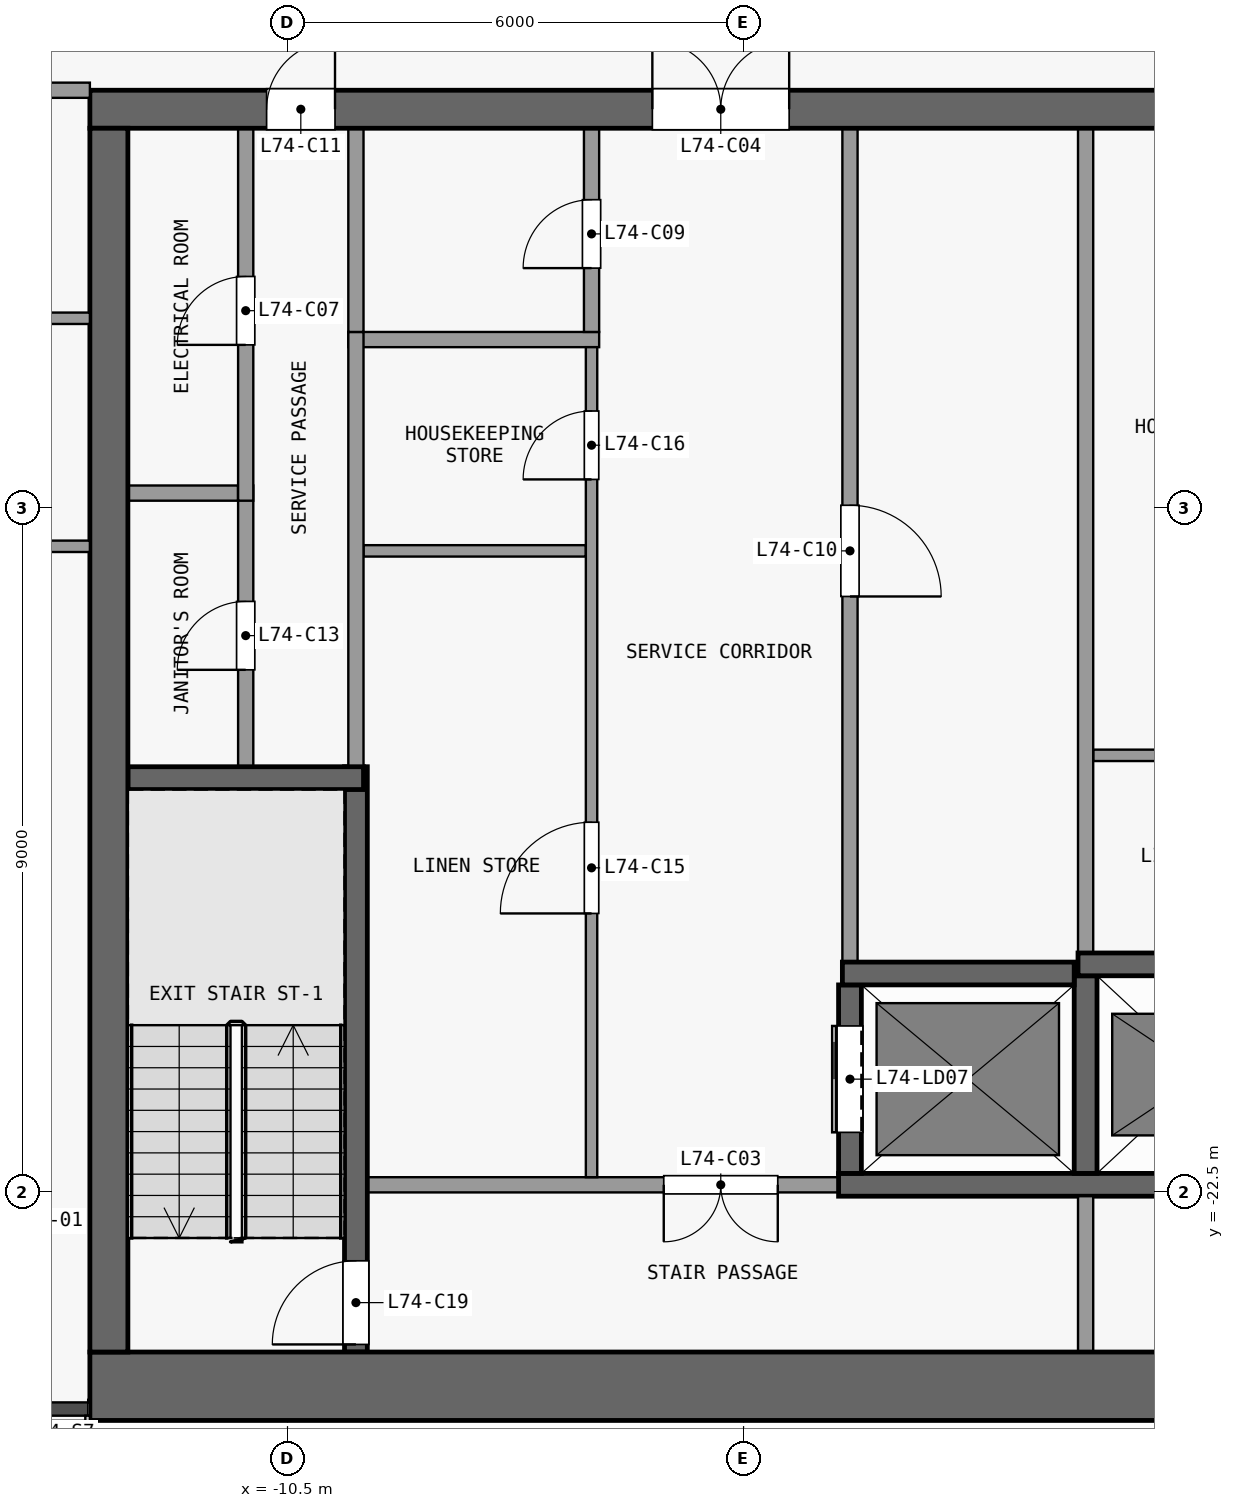
"""IFC4 building model, lengths in metres.
Left out: names, types, materials, properties, quantities, classifications, styles, units other than length and angle.
Written with IfcOpenShell. Run it as: python <this file> out.ifc"""

import sys

from ifc_helpers import new_model, si_unit, direction, frame, frame_2d, origin, place, context, subcontext, project, spatial, rectangle, extrude, element, fill, save


model = new_model("IFC4")
c1 = context("Model", 3, precision=1e-05, world=origin(), true_north=direction((0.0, 1.0)))
c2 = subcontext(c1, "Body", "Model", "MODEL_VIEW")
j1 = project(units=[si_unit("LENGTHUNIT", "METRE"), si_unit("PLANEANGLEUNIT", "RADIAN")], contexts=[c1])
p1 = place(None, origin())
s1 = spatial("IfcSite", under=j1, at=p1, CompositionType="ELEMENT")
p2 = place(p1, origin())
s2 = spatial("IfcBuilding", under=s1, at=p2, CompositionType="ELEMENT")
p3 = place(p2, frame((0.0, 0.0, 291.5)))
s3 = spatial("IfcBuildingStorey", under=s2, at=p3, CompositionType="ELEMENT", Elevation=291.5)
p4 = place(p3, frame((-13.1, -25.05, 0.0), z_axis=(0.0, 0.0, 1.0), x_axis=(1.0, 0.0, 0.0)))
e1 = element("IfcWall", 1, at=p4, inside=s3, PredefinedType="SHEAR", context=c2, shape_type="SweptSolid", body=[
    extrude(rectangle(XDim=26.2, YDim=0.9, at=frame_2d((13.1, 0.0))), origin(), (0.0, 0.0, 1.0), 3.3),
])
p5 = place(p3, frame((-13.1, -8.25, 0.0), z_axis=(0.0, 0.0, 1.0), x_axis=(1.0, 0.0, 0.0)))
e2 = element("IfcWall", 2, at=p5, inside=s3, PredefinedType="SHEAR", context=c2, shape_type="SweptSolid", body=[
    extrude(rectangle(XDim=26.2, YDim=0.5, at=frame_2d((13.1, 0.0))), origin(), (0.0, 0.0, 1.0), 3.3),
])
p6 = place(p5, frame((7.4, 0.0, 0.0)))
e3 = element("IfcOpeningElement", 3, at=p6, cuts=e2, PredefinedType="OPENING", context=c2, shape_type="SweptSolid", body=[
    extrude(rectangle(XDim=1.8, YDim=2.1, at=frame_2d((0.9, 1.05))), frame((0.0, 0.26, 0.0), z_axis=(0.0, -1.0, 0.0), x_axis=(1.0, 0.0, 0.0)), (0.0, 0.0, 1.0), 0.52),
])
p7 = place(p5, frame((17.0, 0.0, 0.0)))
e4 = element("IfcOpeningElement", 4, at=p7, cuts=e2, PredefinedType="OPENING", context=c2, shape_type="SweptSolid", body=[
    extrude(rectangle(XDim=1.8, YDim=2.1, at=frame_2d((0.9, 1.05))), frame((0.0, 0.26, 0.0), z_axis=(0.0, -1.0, 0.0), x_axis=(1.0, 0.0, 0.0)), (0.0, 0.0, 1.0), 0.52),
])
p8 = place(p5, frame((2.325, 0.0, 0.0)))
e5 = element("IfcOpeningElement", 5, at=p8, cuts=e2, PredefinedType="OPENING", context=c2, shape_type="SweptSolid", body=[
    extrude(rectangle(XDim=0.9, YDim=2.1, at=frame_2d((0.45, 1.05))), frame((0.0, 0.26, 0.0), z_axis=(0.0, -1.0, 0.0), x_axis=(1.0, 0.0, 0.0)), (0.0, 0.0, 1.0), 0.52),
])
p9 = place(p5, frame((22.975, 0.0, 0.0)))
e6 = element("IfcOpeningElement", 6, at=p9, cuts=e2, PredefinedType="OPENING", context=c2, shape_type="SweptSolid", body=[
    extrude(rectangle(XDim=0.9, YDim=2.1, at=frame_2d((0.45, 1.05))), frame((0.0, 0.26, 0.0), z_axis=(0.0, -1.0, 0.0), x_axis=(1.0, 0.0, 0.0)), (0.0, 0.0, 1.0), 0.52),
])
p10 = place(p3, frame((-12.85, -24.6, 0.0), z_axis=(0.0, 0.0, 1.0), x_axis=(0.0, 1.0, 0.0)))
e7 = element("IfcWall", 7, at=p10, inside=s3, PredefinedType="SHEAR", context=c2, shape_type="SweptSolid", body=[
    extrude(rectangle(XDim=16.1, YDim=0.5, at=frame_2d((8.05, 0.0))), origin(), (0.0, 0.0, 1.0), 3.3),
])
p11 = place(p3, frame((-3.25, -22.4, 0.0), z_axis=(0.0, 0.0, 1.0), x_axis=(-1.0, 0.0, 0.0)))
e8 = element("IfcWall", 8, at=p11, inside=s3, PredefinedType="PARTITIONING", context=c2, shape_type="SweptSolid", body=[
    extrude(rectangle(XDim=6.2, YDim=0.2, at=frame_2d((3.1, 0.0))), origin(), (0.0, 0.0, 1.0), 3.3),
])
p12 = place(p11, frame((0.8, 0.0, 0.0)))
e9 = element("IfcOpeningElement", 9, at=p12, cuts=e8, PredefinedType="OPENING", context=c2, shape_type="SweptSolid", body=[
    extrude(rectangle(XDim=1.5, YDim=2.1, at=frame_2d((0.75, 1.05))), frame((0.0, 0.11, 0.0), z_axis=(0.0, -1.0, 0.0), x_axis=(1.0, 0.0, 0.0)), (0.0, 0.0, 1.0), 0.22),
])
p13 = place(p3, frame((-3.25, -22.4, 0.0), z_axis=(0.0, 0.0, 1.0), x_axis=(1.0, 0.0, 0.0)))
e10 = element("IfcWall", 10, at=p13, inside=s3, PredefinedType="SHEAR", context=c2, shape_type="SweptSolid", body=[
    extrude(rectangle(XDim=6.5, YDim=0.3, at=frame_2d((3.25, 0.0))), origin(), (0.0, 0.0, 1.0), 3.3),
])
p14 = place(p3, frame((-3.2, -19.62, 0.0), z_axis=(0.0, 0.0, 1.0), x_axis=(1.0, 0.0, 0.0)))
e11 = element("IfcWall", 11, at=p14, inside=s3, PredefinedType="SHEAR", context=c2, shape_type="SweptSolid", body=[
    extrude(rectangle(XDim=3.05, YDim=0.3, at=frame_2d((1.525, 0.0))), origin(), (0.0, 0.0, 1.0), 3.3),
])
p15 = place(p3, frame((-0.1, -19.5, 0.0), z_axis=(0.0, 0.0, 1.0), x_axis=(1.0, 0.0, 0.0)))
e12 = element("IfcWall", 12, at=p15, inside=s3, PredefinedType="SHEAR", context=c2, shape_type="SweptSolid", body=[
    extrude(rectangle(XDim=3.275, YDim=0.3, at=frame_2d((1.638, 0.0))), origin(), (0.0, 0.0, 1.0), 3.3),
])
p16 = place(p3, frame((-12.6, -17.05, 0.0), z_axis=(0.0, 0.0, 1.0), x_axis=(1.0, 0.0, 0.0)))
e13 = element("IfcWall", 13, at=p16, inside=s3, PredefinedType="SHEAR", context=c2, shape_type="SweptSolid", body=[
    extrude(rectangle(XDim=3.1, YDim=0.3, at=frame_2d((1.55, 0.0))), origin(), (0.0, 0.0, 1.0), 3.3),
])
p17 = place(p3, frame((0.1, -16.75, 0.0), z_axis=(0.0, 0.0, 1.0), x_axis=(1.0, 0.0, 0.0)))
e14 = element("IfcWall", 14, at=p17, inside=s3, PredefinedType="PARTITIONING", context=c2, shape_type="SweptSolid", body=[
    extrude(rectangle(XDim=2.925, YDim=0.15, at=frame_2d((1.462, 0.0))), origin(), (0.0, 0.0, 1.0), 3.3),
])
p18 = place(p3, frame((-9.5, -14.06, 0.0), z_axis=(0.0, 0.0, 1.0), x_axis=(1.0, 0.0, 0.0)))
e15 = element("IfcWall", 15, at=p18, inside=s3, PredefinedType="PARTITIONING", context=c2, shape_type="SweptSolid", body=[
    extrude(rectangle(XDim=2.925, YDim=0.15, at=frame_2d((1.462, 0.0))), origin(), (0.0, 0.0, 1.0), 3.3),
])
p19 = place(p3, frame((-12.6, -13.3, 0.0), z_axis=(0.0, 0.0, 1.0), x_axis=(1.0, 0.0, 0.0)))
e16 = element("IfcWall", 16, at=p19, inside=s3, PredefinedType="PARTITIONING", context=c2, shape_type="SweptSolid", body=[
    extrude(rectangle(XDim=1.45, YDim=0.2, at=frame_2d((0.725, 0.0))), origin(), (0.0, 0.0, 1.0), 3.3),
])
p20 = place(p3, frame((-9.7, -11.28, 0.0), z_axis=(0.0, 0.0, 1.0), x_axis=(1.0, 0.0, 0.0)))
e17 = element("IfcWall", 17, at=p20, inside=s3, PredefinedType="PARTITIONING", context=c2, shape_type="SweptSolid", body=[
    extrude(rectangle(XDim=3.3, YDim=0.2, at=frame_2d((1.65, 0.0))), origin(), (0.0, 0.0, 1.0), 3.3),
])
p21 = place(p3, frame((-11.05, -16.9, 0.0), z_axis=(0.0, 0.0, 1.0), x_axis=(0.0, 1.0, 0.0)))
e18 = element("IfcWall", 18, at=p21, inside=s3, PredefinedType="PARTITIONING", context=c2, shape_type="SweptSolid", body=[
    extrude(rectangle(XDim=3.7, YDim=0.2, at=frame_2d((1.85, 0.0))), origin(), (0.0, 0.0, 1.0), 3.3),
])
p22 = place(p21, frame((1.275, 0.0, 0.0)))
e19 = element("IfcOpeningElement", 19, at=p22, cuts=e18, PredefinedType="OPENING", context=c2, shape_type="SweptSolid", body=[
    extrude(rectangle(XDim=0.9, YDim=2.1, at=frame_2d((0.45, 1.05))), frame((0.0, 0.11, 0.0), z_axis=(0.0, -1.0, 0.0), x_axis=(1.0, 0.0, 0.0)), (0.0, 0.0, 1.0), 0.22),
])
p23 = place(p3, frame((-11.05, -13.4, 0.0), z_axis=(0.0, 0.0, 1.0), x_axis=(0.0, 1.0, 0.0)))
e20 = element("IfcWall", 20, at=p23, inside=s3, PredefinedType="PARTITIONING", context=c2, shape_type="SweptSolid", body=[
    extrude(rectangle(XDim=4.9, YDim=0.2, at=frame_2d((2.45, 0.0))), origin(), (0.0, 0.0, 1.0), 3.3),
])
p24 = place(p23, frame((2.05, 0.0, 0.0)))
e21 = element("IfcOpeningElement", 21, at=p24, cuts=e20, PredefinedType="OPENING", context=c2, shape_type="SweptSolid", body=[
    extrude(rectangle(XDim=0.9, YDim=2.1, at=frame_2d((0.45, 1.05))), frame((0.0, 0.11, 0.0), z_axis=(0.0, -1.0, 0.0), x_axis=(1.0, 0.0, 0.0)), (0.0, 0.0, 1.0), 0.22),
])
p25 = place(p3, frame((-9.6, -24.6, 0.0), z_axis=(0.0, 0.0, 1.0), x_axis=(0.0, 1.0, 0.0)))
e22 = element("IfcWall", 22, at=p25, inside=s3, PredefinedType="SHEAR", context=c2, shape_type="SweptSolid", body=[
    extrude(rectangle(XDim=7.7, YDim=0.3, at=frame_2d((3.85, 0.0))), origin(), (0.0, 0.0, 1.0), 3.3),
])
p26 = place(p25, frame((0.1, 0.0, 0.0)))
e23 = element("IfcOpeningElement", 23, at=p26, cuts=e22, PredefinedType="OPENING", context=c2, shape_type="SweptSolid", body=[
    extrude(rectangle(XDim=1.1, YDim=2.1, at=frame_2d((0.55, 1.05))), frame((0.0, 0.16, 0.0), z_axis=(0.0, -1.0, 0.0), x_axis=(1.0, 0.0, 0.0)), (0.0, 0.0, 1.0), 0.32),
])
p27 = place(p3, frame((-9.6, -16.9, 0.0), z_axis=(0.0, 0.0, 1.0), x_axis=(0.0, 1.0, 0.0)))
e24 = element("IfcWall", 24, at=p27, inside=s3, PredefinedType="PARTITIONING", context=c2, shape_type="SweptSolid", body=[
    extrude(rectangle(XDim=5.72, YDim=0.2, at=frame_2d((2.86, 0.0))), origin(), (0.0, 0.0, 1.0), 3.3),
])
p28 = place(p3, frame((-9.6, -11.18, 0.0), z_axis=(0.0, 0.0, 1.0), x_axis=(0.0, 1.0, 0.0)))
e25 = element("IfcWall", 25, at=p28, inside=s3, PredefinedType="PARTITIONING", context=c2, shape_type="SweptSolid", body=[
    extrude(rectangle(XDim=2.68, YDim=0.2, at=frame_2d((1.34, 0.0))), origin(), (0.0, 0.0, 1.0), 3.3),
])
p29 = place(p3, frame((-6.5, -22.3, 0.0), z_axis=(0.0, 0.0, 1.0), x_axis=(0.0, 1.0, 0.0)))
e26 = element("IfcWall", 26, at=p29, inside=s3, PredefinedType="PARTITIONING", context=c2, shape_type="SweptSolid", body=[
    extrude(rectangle(XDim=10.92, YDim=0.15, at=frame_2d((5.46, 0.0))), origin(), (0.0, 0.0, 1.0), 3.3),
])
p30 = place(p29, frame((3.47, 0.0, 0.0)))
e27 = element("IfcOpeningElement", 27, at=p30, cuts=e26, PredefinedType="OPENING", context=c2, shape_type="SweptSolid", body=[
    extrude(rectangle(XDim=1.2, YDim=2.1, at=frame_2d((0.6, 1.05))), frame((0.0, 0.085, 0.0), z_axis=(0.0, -1.0, 0.0), x_axis=(1.0, 0.0, 0.0)), (0.0, 0.0, 1.0), 0.17),
])
p31 = place(p29, frame((9.18, 0.0, 0.0)))
e28 = element("IfcOpeningElement", 28, at=p31, cuts=e26, PredefinedType="OPENING", context=c2, shape_type="SweptSolid", body=[
    extrude(rectangle(XDim=0.9, YDim=2.1, at=frame_2d((0.45, 1.05))), frame((0.0, 0.085, 0.0), z_axis=(0.0, -1.0, 0.0), x_axis=(1.0, 0.0, 0.0)), (0.0, 0.0, 1.0), 0.17),
])
p32 = place(p3, frame((-6.5, -11.18, 0.0), z_axis=(0.0, 0.0, 1.0), x_axis=(0.0, 1.0, 0.0)))
e29 = element("IfcWall", 29, at=p32, inside=s3, PredefinedType="PARTITIONING", context=c2, shape_type="SweptSolid", body=[
    extrude(rectangle(XDim=2.68, YDim=0.2, at=frame_2d((1.34, 0.0))), origin(), (0.0, 0.0, 1.0), 3.3),
])
p33 = place(p32, frame((0.84, 0.0, 0.0)))
e30 = element("IfcOpeningElement", 30, at=p33, cuts=e29, PredefinedType="OPENING", context=c2, shape_type="SweptSolid", body=[
    extrude(rectangle(XDim=0.9, YDim=2.1, at=frame_2d((0.45, 1.05))), frame((0.0, 0.11, 0.0), z_axis=(0.0, -1.0, 0.0), x_axis=(1.0, 0.0, 0.0)), (0.0, 0.0, 1.0), 0.22),
])
p34 = place(p3, frame((-3.1, -22.25, 0.0), z_axis=(0.0, 0.0, 1.0), x_axis=(0.0, 1.0, 0.0)))
e31 = element("IfcWall", 31, at=p34, inside=s3, PredefinedType="SHEAR", context=c2, shape_type="SweptSolid", body=[
    extrude(rectangle(XDim=2.48, YDim=0.3, at=frame_2d((1.24, 0.0))), origin(), (0.0, 0.0, 1.0), 3.3),
])
p35 = place(p34, frame((0.54, 0.0, 0.0)))
e32 = element("IfcOpeningElement", 32, at=p35, cuts=e31, PredefinedType="OPENING", context=c2, shape_type="SweptSolid", body=[
    extrude(rectangle(XDim=1.4, YDim=2.1, at=frame_2d((0.7, 1.05))), frame((0.0, 0.16, 0.0), z_axis=(0.0, -1.0, 0.0), x_axis=(1.0, 0.0, 0.0)), (0.0, 0.0, 1.0), 0.32),
])
p36 = place(p3, frame((-3.1, -8.5, 0.0), z_axis=(0.0, 0.0, 1.0), x_axis=(0.0, -1.0, 0.0)))
e33 = element("IfcWall", 33, at=p36, inside=s3, PredefinedType="PARTITIONING", context=c2, shape_type="SweptSolid", body=[
    extrude(rectangle(XDim=10.97, YDim=0.2, at=frame_2d((5.485, 0.0))), origin(), (0.0, 0.0, 1.0), 3.3),
])
p37 = place(p36, frame((4.96, 0.0, 0.0)))
e34 = element("IfcOpeningElement", 34, at=p37, cuts=e33, PredefinedType="OPENING", context=c2, shape_type="SweptSolid", body=[
    extrude(rectangle(XDim=1.2, YDim=2.1, at=frame_2d((0.6, 1.05))), frame((0.0, 0.11, 0.0), z_axis=(0.0, -1.0, 0.0), x_axis=(1.0, 0.0, 0.0)), (0.0, 0.0, 1.0), 0.22),
])
p38 = place(p3, frame((0.0, -24.6, 0.0), z_axis=(0.0, 0.0, 1.0), x_axis=(0.0, 1.0, 0.0)))
e35 = element("IfcWall", 35, at=p38, inside=s3, PredefinedType="PARTITIONING", context=c2, shape_type="SweptSolid", body=[
    extrude(rectangle(XDim=2.05, YDim=0.2, at=frame_2d((1.025, 0.0))), origin(), (0.0, 0.0, 1.0), 3.3),
])
p39 = place(p3, frame((0.0, -22.25, 0.0), z_axis=(0.0, 0.0, 1.0), x_axis=(0.0, 1.0, 0.0)))
e36 = element("IfcWall", 36, at=p39, inside=s3, PredefinedType="SHEAR", context=c2, shape_type="SweptSolid", body=[
    extrude(rectangle(XDim=2.6, YDim=0.3, at=frame_2d((1.3, 0.0))), origin(), (0.0, 0.0, 1.0), 3.3),
])
p40 = place(p3, frame((0.0, -19.35, 0.0), z_axis=(0.0, 0.0, 1.0), x_axis=(0.0, 1.0, 0.0)))
e37 = element("IfcWall", 37, at=p40, inside=s3, PredefinedType="PARTITIONING", context=c2, shape_type="SweptSolid", body=[
    extrude(rectangle(XDim=10.85, YDim=0.2, at=frame_2d((5.425, 0.0))), origin(), (0.0, 0.0, 1.0), 3.3),
])
p41 = place(p3, frame((-19.262, -14.0, 0.0), z_axis=(0.0, 0.0, 1.0), x_axis=(1.0, 0.0, 0.0)))
e38 = element("IfcWall", 38, at=p41, inside=s3, PredefinedType="PARTITIONING", context=c2, shape_type="SweptSolid", body=[
    extrude(rectangle(XDim=6.162, YDim=0.15, at=frame_2d((3.081, 0.0))), origin(), (0.0, 0.0, 1.0), 3.3),
])
p42 = place(p41, frame((0.812, 0.0, 0.0)))
e39 = element("IfcOpeningElement", 39, at=p42, cuts=e38, PredefinedType="OPENING", context=c2, shape_type="SweptSolid", body=[
    extrude(rectangle(XDim=0.9, YDim=2.1, at=frame_2d((0.45, 1.05))), frame((0.0, 0.085, 0.0), z_axis=(0.0, -1.0, 0.0), x_axis=(1.0, 0.0, 0.0)), (0.0, 0.0, 1.0), 0.17),
])
p43 = place(p3, frame((-20.163, -11.0, 0.0), z_axis=(0.0, 0.0, 1.0), x_axis=(1.0, 0.0, 0.0)))
e40 = element("IfcWall", 40, at=p43, inside=s3, PredefinedType="PARTITIONING", context=c2, shape_type="SweptSolid", body=[
    extrude(rectangle(XDim=7.062, YDim=0.15, at=frame_2d((3.531, 0.0))), origin(), (0.0, 0.0, 1.0), 3.3),
])
p44 = place(p43, frame((1.513, 0.0, 0.0)))
e41 = element("IfcOpeningElement", 41, at=p44, cuts=e40, PredefinedType="OPENING", context=c2, shape_type="SweptSolid", body=[
    extrude(rectangle(XDim=0.9, YDim=2.1, at=frame_2d((0.45, 1.05))), frame((0.0, 0.085, 0.0), z_axis=(0.0, -1.0, 0.0), x_axis=(1.0, 0.0, 0.0)), (0.0, 0.0, 1.0), 0.17),
])
p45 = place(p43, frame((5.063, 0.0, 0.0)))
e42 = element("IfcOpeningElement", 42, at=p45, cuts=e40, PredefinedType="OPENING", context=c2, shape_type="SweptSolid", body=[
    extrude(rectangle(XDim=0.9, YDim=2.1, at=frame_2d((0.45, 1.05))), frame((0.0, 0.085, 0.0), z_axis=(0.0, -1.0, 0.0), x_axis=(1.0, 0.0, 0.0)), (0.0, 0.0, 1.0), 0.17),
])
p46 = place(p3, frame((-20.163, -8.0, 0.0), z_axis=(0.0, 0.0, 1.0), x_axis=(1.0, 0.0, 0.0)))
e43 = element("IfcWall", 43, at=p46, inside=s3, PredefinedType="PARTITIONING", context=c2, shape_type="SweptSolid", body=[
    extrude(rectangle(XDim=7.062, YDim=0.2, at=frame_2d((3.531, 0.0))), origin(), (0.0, 0.0, 1.0), 3.3),
])
p47 = place(p46, frame((3.013, 0.0, 0.0)))
e44 = element("IfcOpeningElement", 44, at=p47, cuts=e43, PredefinedType="OPENING", context=c2, shape_type="SweptSolid", body=[
    extrude(rectangle(XDim=1.0, YDim=2.1, at=frame_2d((0.5, 1.05))), frame((0.0, 0.11, 0.0), z_axis=(0.0, -1.0, 0.0), x_axis=(1.0, 0.0, 0.0)), (0.0, 0.0, 1.0), 0.22),
])
p48 = place(p35, origin())
e45 = element("IfcDoor", 45, at=p48, inside=s3, OperationType="DOUBLE_DOOR_SLIDING", PredefinedType="DOOR", context=c2, shape_type="SweptSolid", body=[
    extrude(rectangle(XDim=1.4, YDim=2.1, at=frame_2d((0.7, 1.05))), frame((0.0, 0.025, 0.0), z_axis=(0.0, -1.0, 0.0), x_axis=(1.0, 0.0, 0.0)), (0.0, 0.0, 1.0), 0.05),
])
fill(e32, e45)
p49 = place(p12, origin())
e46 = element("IfcDoor", 46, at=p49, inside=s3, OperationType="DOUBLE_DOOR_SINGLE_SWING", PredefinedType="DOOR", context=c2, shape_type="SweptSolid", body=[
    extrude(rectangle(XDim=1.5, YDim=2.1, at=frame_2d((0.75, 1.05))), frame((0.0, 0.025, 0.0), z_axis=(0.0, -1.0, 0.0), x_axis=(1.0, 0.0, 0.0)), (0.0, 0.0, 1.0), 0.05),
])
fill(e9, e46)
p50 = place(p6, origin())
e47 = element("IfcDoor", 47, at=p50, inside=s3, OperationType="DOUBLE_DOOR_SINGLE_SWING", PredefinedType="DOOR", context=c2, shape_type="SweptSolid", body=[
    extrude(rectangle(XDim=1.8, YDim=2.1, at=frame_2d((0.9, 1.05))), frame((0.0, 0.025, 0.0), z_axis=(0.0, -1.0, 0.0), x_axis=(1.0, 0.0, 0.0)), (0.0, 0.0, 1.0), 0.05),
])
fill(e3, e47)
p51 = place(p24, origin())
e48 = element("IfcDoor", 48, at=p51, inside=s3, OperationType="SINGLE_SWING_LEFT", PredefinedType="DOOR", context=c2, shape_type="SweptSolid", body=[
    extrude(rectangle(XDim=0.9, YDim=2.1, at=frame_2d((0.45, 1.05))), frame((0.0, 0.025, 0.0), z_axis=(0.0, -1.0, 0.0), x_axis=(1.0, 0.0, 0.0)), (0.0, 0.0, 1.0), 0.05),
])
fill(e21, e48)
p52 = place(p33, origin())
e49 = element("IfcDoor", 49, at=p52, inside=s3, OperationType="SINGLE_SWING_LEFT", PredefinedType="DOOR", context=c2, shape_type="SweptSolid", body=[
    extrude(rectangle(XDim=0.9, YDim=2.1, at=frame_2d((0.45, 1.05))), frame((0.0, 0.025, 0.0), z_axis=(0.0, -1.0, 0.0), x_axis=(1.0, 0.0, 0.0)), (0.0, 0.0, 1.0), 0.05),
])
fill(e30, e49)
p53 = place(p37, origin())
e50 = element("IfcDoor", 50, at=p53, inside=s3, OperationType="SINGLE_SWING_RIGHT", PredefinedType="DOOR", context=c2, shape_type="SweptSolid", body=[
    extrude(rectangle(XDim=1.2, YDim=2.1, at=frame_2d((0.6, 1.05))), frame((0.0, 0.025, 0.0), z_axis=(0.0, -1.0, 0.0), x_axis=(1.0, 0.0, 0.0)), (0.0, 0.0, 1.0), 0.05),
])
fill(e34, e50)
p54 = place(p8, origin())
e51 = element("IfcDoor", 51, at=p54, inside=s3, OperationType="SINGLE_SWING_RIGHT", PredefinedType="DOOR", context=c2, shape_type="SweptSolid", body=[
    extrude(rectangle(XDim=0.9, YDim=2.1, at=frame_2d((0.45, 1.05))), frame((0.0, 0.025, 0.0), z_axis=(0.0, -1.0, 0.0), x_axis=(1.0, 0.0, 0.0)), (0.0, 0.0, 1.0), 0.05),
])
fill(e5, e51)
p55 = place(p22, origin())
e52 = element("IfcDoor", 52, at=p55, inside=s3, OperationType="SINGLE_SWING_LEFT", PredefinedType="DOOR", context=c2, shape_type="SweptSolid", body=[
    extrude(rectangle(XDim=0.9, YDim=2.1, at=frame_2d((0.45, 1.05))), frame((0.0, 0.025, 0.0), z_axis=(0.0, -1.0, 0.0), x_axis=(1.0, 0.0, 0.0)), (0.0, 0.0, 1.0), 0.05),
])
fill(e19, e52)
p56 = place(p30, origin())
e53 = element("IfcDoor", 53, at=p56, inside=s3, OperationType="SINGLE_SWING_LEFT", PredefinedType="DOOR", context=c2, shape_type="SweptSolid", body=[
    extrude(rectangle(XDim=1.2, YDim=2.1, at=frame_2d((0.6, 1.05))), frame((0.0, 0.025, 0.0), z_axis=(0.0, -1.0, 0.0), x_axis=(1.0, 0.0, 0.0)), (0.0, 0.0, 1.0), 0.05),
])
fill(e27, e53)
p57 = place(p31, origin())
e54 = element("IfcDoor", 54, at=p57, inside=s3, OperationType="SINGLE_SWING_LEFT", PredefinedType="DOOR", context=c2, shape_type="SweptSolid", body=[
    extrude(rectangle(XDim=0.9, YDim=2.1, at=frame_2d((0.45, 1.05))), frame((0.0, 0.025, 0.0), z_axis=(0.0, -1.0, 0.0), x_axis=(1.0, 0.0, 0.0)), (0.0, 0.0, 1.0), 0.05),
])
fill(e28, e54)
p58 = place(p26, origin())
e55 = element("IfcDoor", 55, at=p58, inside=s3, OperationType="SINGLE_SWING_LEFT", PredefinedType="DOOR", context=c2, shape_type="SweptSolid", body=[
    extrude(rectangle(XDim=1.1, YDim=2.1, at=frame_2d((0.55, 1.05))), frame((0.0, 0.025, 0.0), z_axis=(0.0, -1.0, 0.0), x_axis=(1.0, 0.0, 0.0)), (0.0, 0.0, 1.0), 0.05),
])
fill(e23, e55)
save(model, sys.argv[1])
